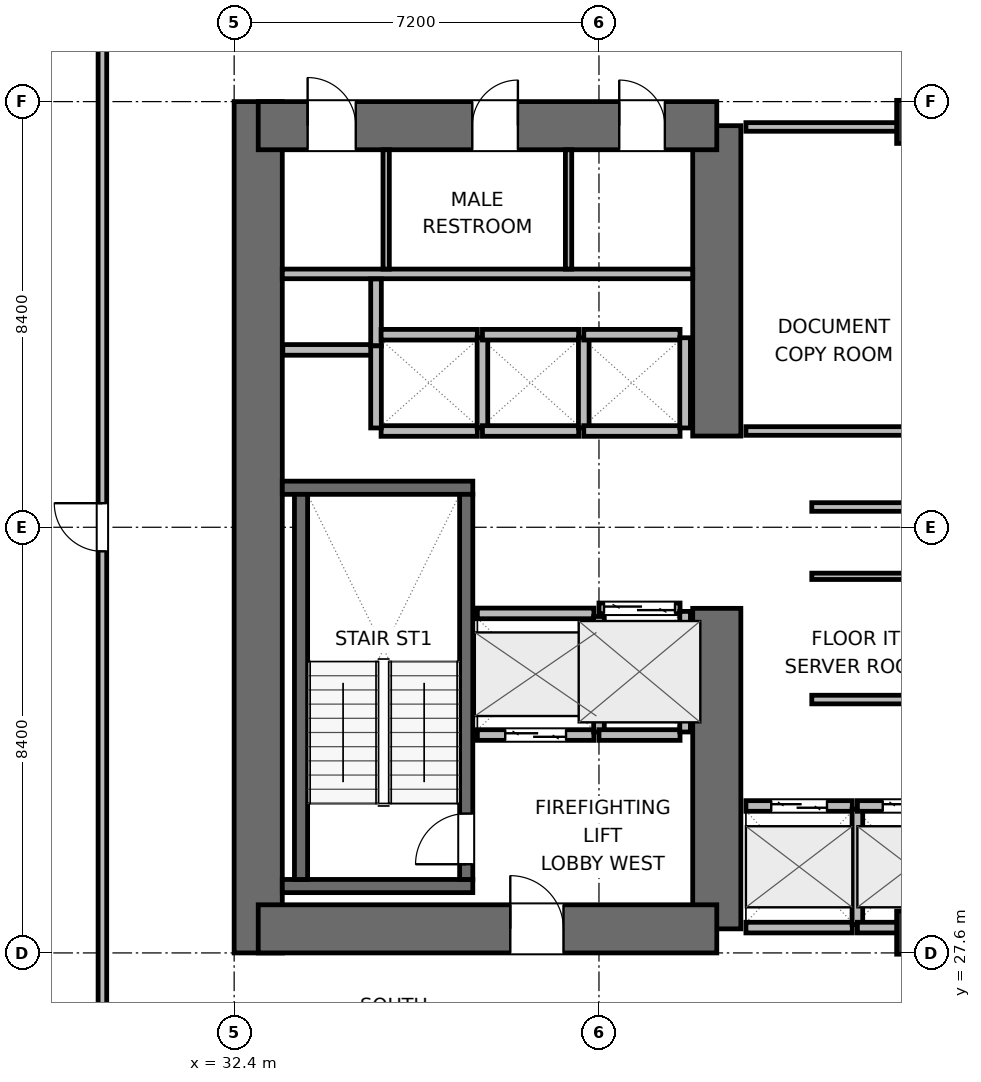
"""IFC4 building model, lengths in metres.
Left out: names, types, materials, properties, quantities, classifications, styles, units other than length and angle.
Written with IfcOpenShell. Run it as: python <this file> out.ifc"""

import sys

from ifc_helpers import new_model, si_unit, direction, frame, frame_2d, origin, origin_2d, place, context, subcontext, project, spatial, rectangle, extrude, element, fill, save


model = new_model("IFC4")
c1 = context("Model", 3, precision=1e-05, world=origin(), true_north=direction((0.0, 1.0)))
c2 = subcontext(c1, "Body", "Model", "MODEL_VIEW")
j1 = project(units=[si_unit("LENGTHUNIT", "METRE"), si_unit("PLANEANGLEUNIT", "RADIAN")], contexts=[c1])
p1 = place(None, origin())
s1 = spatial("IfcSite", under=j1, at=p1, CompositionType="ELEMENT")
p2 = place(p1, origin())
s2 = spatial("IfcBuilding", under=s1, at=p2, CompositionType="ELEMENT")
p3 = place(p2, frame((0.0, 0.0, 52.8)))
s3 = spatial("IfcBuildingStorey", under=s2, at=p3, CompositionType="ELEMENT", Elevation=52.8)
p4 = place(p3, frame((32.875, 27.6, 0.0), z_axis=(0.0, 0.0, 1.0), x_axis=(0.0, 1.0, 0.0)))
e1 = element("IfcWall", 1, at=p4, inside=s3, PredefinedType="SHEAR", context=c2, shape_type="SweptSolid", body=[
    extrude(rectangle(XDim=16.8, YDim=0.95, at=frame_2d((8.4, 0.0))), origin(), (0.0, 0.0, 1.0), 3.9),
])
p5 = place(p3, frame((41.925, 28.075, 0.0), z_axis=(0.0, 0.0, 1.0), x_axis=(0.0, 1.0, 0.0)))
e2 = element("IfcWall", 2, at=p5, inside=s3, PredefinedType="SHEAR", context=c2, shape_type="SweptSolid", body=[
    extrude(rectangle(XDim=6.325, YDim=0.95, at=frame_2d((3.163, 0.0))), origin(), (0.0, 0.0, 1.0), 3.9),
])
p6 = place(p3, frame((41.925, 37.8, 0.0), z_axis=(0.0, 0.0, 1.0), x_axis=(0.0, 1.0, 0.0)))
e3 = element("IfcWall", 3, at=p6, inside=s3, PredefinedType="SHEAR", context=c2, shape_type="SweptSolid", body=[
    extrude(rectangle(XDim=6.125, YDim=0.95, at=frame_2d((3.062, 0.0))), origin(), (0.0, 0.0, 1.0), 3.9),
])
p7 = place(p3, frame((32.875, 28.075, 0.0), z_axis=(0.0, 0.0, 1.0), x_axis=(1.0, 0.0, 0.0)))
e4 = element("IfcWall", 4, at=p7, inside=s3, PredefinedType="SHEAR", context=c2, shape_type="SweptSolid", body=[
    extrude(rectangle(XDim=9.05, YDim=0.95, at=frame_2d((4.525, 0.0))), origin(), (0.0, 0.0, 1.0), 3.9),
])
p8 = place(p7, frame((4.975, 0.0, 0.0)))
e5 = element("IfcOpeningElement", 5, at=p8, cuts=e4, PredefinedType="OPENING", context=c2, shape_type="SweptSolid", body=[
    extrude(rectangle(XDim=1.05, YDim=2.04, at=frame_2d((0.525, 1.02))), frame((0.0, 0.485, 0.0), z_axis=(0.0, -1.0, 0.0), x_axis=(1.0, 0.0, 0.0)), (0.0, 0.0, 1.0), 0.97),
])
p9 = place(p3, frame((32.875, 43.925, 0.0), z_axis=(0.0, 0.0, 1.0), x_axis=(1.0, 0.0, 0.0)))
e6 = element("IfcWall", 6, at=p9, inside=s3, PredefinedType="SHEAR", context=c2, shape_type="SweptSolid", body=[
    extrude(rectangle(XDim=9.05, YDim=0.95, at=frame_2d((4.525, 0.0))), origin(), (0.0, 0.0, 1.0), 3.9),
])
p10 = place(p9, frame((0.975, 0.0, 0.0)))
e7 = element("IfcOpeningElement", 7, at=p10, cuts=e6, PredefinedType="OPENING", context=c2, shape_type="SweptSolid", body=[
    extrude(rectangle(XDim=0.95, YDim=2.04, at=frame_2d((0.475, 1.02))), frame((0.0, 0.485, 0.0), z_axis=(0.0, -1.0, 0.0), x_axis=(1.0, 0.0, 0.0)), (0.0, 0.0, 1.0), 0.97),
])
p11 = place(p9, frame((4.225, 0.0, 0.0)))
e8 = element("IfcOpeningElement", 8, at=p11, cuts=e6, PredefinedType="OPENING", context=c2, shape_type="SweptSolid", body=[
    extrude(rectangle(XDim=0.9, YDim=2.02, at=frame_2d((0.45, 1.01))), frame((0.0, 0.485, 0.0), z_axis=(0.0, -1.0, 0.0), x_axis=(1.0, 0.0, 0.0)), (0.0, 0.0, 1.0), 0.97),
])
p12 = place(p9, frame((7.125, 0.0, 0.0)))
e9 = element("IfcOpeningElement", 9, at=p12, cuts=e6, PredefinedType="OPENING", context=c2, shape_type="SweptSolid", body=[
    extrude(rectangle(XDim=0.9, YDim=2.02, at=frame_2d((0.45, 1.01))), frame((0.0, 0.485, 0.0), z_axis=(0.0, -1.0, 0.0), x_axis=(1.0, 0.0, 0.0)), (0.0, 0.0, 1.0), 0.97),
])
for number, where, z_axis, x_axis in (
    (10, (33.35, 28.92, 0.0), (0.0, 0.0, 1.0), (1.0, 0.0, 0.0)),
    (11, (33.35, 36.78, 0.0), (0.0, 0.0, 1.0), (1.0, 0.0, 0.0)),
):
    element("IfcWall", number, at=place(p3, frame(where, z_axis=z_axis, x_axis=x_axis)), inside=s3, PredefinedType="SHEAR", context=c2, shape_type="SweptSolid", body=[
        extrude(rectangle(XDim=3.76, YDim=0.26, at=frame_2d((1.88, 0.0))), origin(), (0.0, 0.0, 1.0), 3.9),
    ])
p13 = place(p3, frame((33.72, 29.05, 0.0), z_axis=(0.0, 0.0, 1.0), x_axis=(0.0, 1.0, 0.0)))
e12 = element("IfcWall", 12, at=p13, inside=s3, PredefinedType="SHEAR", context=c2, shape_type="SweptSolid", body=[
    extrude(rectangle(XDim=7.6, YDim=0.26, at=frame_2d((3.8, 0.0))), origin(), (0.0, 0.0, 1.0), 3.9),
])
p14 = place(p3, frame((36.98, 29.05, 0.0), z_axis=(0.0, 0.0, 1.0), x_axis=(0.0, 1.0, 0.0)))
e13 = element("IfcWall", 13, at=p14, inside=s3, PredefinedType="SHEAR", context=c2, shape_type="SweptSolid", body=[
    extrude(rectangle(XDim=7.6, YDim=0.26, at=frame_2d((3.8, 0.0))), origin(), (0.0, 0.0, 1.0), 3.9),
])
p15 = place(p14, frame((0.3, 0.0, 0.0)))
e14 = element("IfcOpeningElement", 14, at=p15, cuts=e13, PredefinedType="OPENING", context=c2, shape_type="SweptSolid", body=[
    extrude(rectangle(XDim=1.0, YDim=2.04, at=frame_2d((0.5, 1.02))), frame((0.0, 0.14, 0.0), z_axis=(0.0, -1.0, 0.0), x_axis=(1.0, 0.0, 0.0)), (0.0, 0.0, 1.0), 0.28),
])
for number, where, z_axis, x_axis in (
    (15, (45.9, 28.0, 0.0), (0.0, 0.0, 1.0), (1.0, 0.0, 0.0)),
    (16, (45.9, 44.0, 0.0), (0.0, 0.0, 1.0), (1.0, 0.0, 0.0)),
):
    element("IfcColumn", number, at=place(p3, frame(where, z_axis=z_axis, x_axis=x_axis)), inside=s3, PredefinedType="COLUMN", context=c2, shape_type="SweptSolid", body=[
        extrude(rectangle(XDim=0.85, YDim=0.85, at=origin_2d()), origin(), (0.0, 0.0, 1.0), 3.9),
    ])
p16 = place(p3, frame((33.35, 41.0, 0.0), z_axis=(0.0, 0.0, 1.0), x_axis=(1.0, 0.0, 0.0)))
e17 = element("IfcWall", 17, at=p16, inside=s3, PredefinedType="PLUMBINGWALL", context=c2, shape_type="SweptSolid", body=[
    extrude(rectangle(XDim=8.1, YDim=0.19, at=frame_2d((4.05, 0.0))), origin(), (0.0, 0.0, 1.0), 3.64),
])
for number, where, z_axis, x_axis in (
    (18, (35.4, 41.095, 0.0), (0.0, 0.0, 1.0), (0.0, 1.0, 0.0)),
    (19, (39.0, 41.095, 0.0), (0.0, 0.0, 1.0), (0.0, 1.0, 0.0)),
):
    element("IfcWall", number, at=place(p3, frame(where, z_axis=z_axis, x_axis=x_axis)), inside=s3, PredefinedType="PARTITIONING", context=c2, shape_type="SweptSolid", body=[
        extrude(rectangle(XDim=2.355, YDim=0.125, at=frame_2d((1.177, 0.0))), origin(), (0.0, 0.0, 1.0), 3.64),
    ])
p17 = place(p3, frame((33.36, 39.5, 0.0), z_axis=(0.0, 0.0, 1.0), x_axis=(1.0, 0.0, 0.0)))
e20 = element("IfcWall", 20, at=p17, inside=s3, PredefinedType="PARTITIONING", context=c2, shape_type="SweptSolid", body=[
    extrude(rectangle(XDim=1.86, YDim=0.21, at=frame_2d((0.93, 0.0))), origin(), (0.0, 0.0, 1.0), 3.64),
])
p18 = place(p3, frame((35.2, 39.58, 0.0), z_axis=(0.0, 0.0, 1.0), x_axis=(0.0, 1.0, 0.0)))
e21 = element("IfcWall", 21, at=p18, inside=s3, PredefinedType="PARTITIONING", context=c2, shape_type="SweptSolid", body=[
    extrude(rectangle(XDim=1.32, YDim=0.21, at=frame_2d((0.66, 0.0))), origin(), (0.0, 0.0, 1.0), 3.64),
])
p19 = place(p3, frame((37.2, 31.9, 0.0), z_axis=(0.0, 0.0, 1.0), x_axis=(1.0, 0.0, 0.0)))
e22 = element("IfcWall", 22, at=p19, inside=s3, PredefinedType="PARTITIONING", context=c2, shape_type="SweptSolid", body=[
    extrude(rectangle(XDim=2.3, YDim=0.21, at=frame_2d((1.15, 0.0))), origin(), (0.0, 0.0, 1.0), 3.64),
])
p20 = place(p19, frame((0.55, 0.0, 0.0)))
e23 = element("IfcOpeningElement", 23, at=p20, cuts=e22, PredefinedType="OPENING", context=c2, shape_type="SweptSolid", body=[
    extrude(rectangle(XDim=1.2, YDim=2.04, at=frame_2d((0.6, 1.02))), frame((0.0, 0.115, 0.0), z_axis=(0.0, -1.0, 0.0), x_axis=(1.0, 0.0, 0.0)), (0.0, 0.0, 1.0), 0.23),
])
p21 = place(p3, frame((37.2, 34.3, 0.0), z_axis=(0.0, 0.0, 1.0), x_axis=(1.0, 0.0, 0.0)))
e24 = element("IfcWall", 24, at=p21, inside=s3, PredefinedType="PARTITIONING", context=c2, shape_type="SweptSolid", body=[
    extrude(rectangle(XDim=2.3, YDim=0.21, at=frame_2d((1.15, 0.0))), origin(), (0.0, 0.0, 1.0), 3.64),
])
p22 = place(p3, frame((39.6, 31.96, 0.0), z_axis=(0.0, 0.0, 1.0), x_axis=(0.0, 1.0, 0.0)))
e25 = element("IfcWall", 25, at=p22, inside=s3, PredefinedType="PARTITIONING", context=c2, shape_type="SweptSolid", body=[
    extrude(rectangle(XDim=2.28, YDim=0.21, at=frame_2d((1.14, 0.0))), origin(), (0.0, 0.0, 1.0), 3.64),
])
p23 = place(p3, frame((39.6, 34.4, 0.0), z_axis=(0.0, 0.0, 1.0), x_axis=(1.0, 0.0, 0.0)))
e26 = element("IfcWall", 26, at=p23, inside=s3, PredefinedType="PARTITIONING", context=c2, shape_type="SweptSolid", body=[
    extrude(rectangle(XDim=1.6, YDim=0.21, at=frame_2d((0.8, 0.0))), origin(), (0.0, 0.0, 1.0), 3.64),
])
p24 = place(p23, frame((0.1, 0.0, 0.0)))
e27 = element("IfcOpeningElement", 27, at=p24, cuts=e26, PredefinedType="OPENING", context=c2, shape_type="SweptSolid", body=[
    extrude(rectangle(XDim=1.4, YDim=2.06, at=frame_2d((0.7, 1.03))), frame((0.0, 0.115, 0.0), z_axis=(0.0, -1.0, 0.0), x_axis=(1.0, 0.0, 0.0)), (0.0, 0.0, 1.0), 0.23),
])
p25 = place(p3, frame((39.6, 31.9, 0.0), z_axis=(0.0, 0.0, 1.0), x_axis=(1.0, 0.0, 0.0)))
e28 = element("IfcWall", 28, at=p25, inside=s3, PredefinedType="PARTITIONING", context=c2, shape_type="SweptSolid", body=[
    extrude(rectangle(XDim=1.6, YDim=0.21, at=frame_2d((0.8, 0.0))), origin(), (0.0, 0.0, 1.0), 3.64),
])
p26 = place(p3, frame((41.3, 31.96, 0.0), z_axis=(0.0, 0.0, 1.0), x_axis=(0.0, 1.0, 0.0)))
e29 = element("IfcWall", 29, at=p26, inside=s3, PredefinedType="PARTITIONING", context=c2, shape_type="SweptSolid", body=[
    extrude(rectangle(XDim=2.38, YDim=0.21, at=frame_2d((1.19, 0.0))), origin(), (0.0, 0.0, 1.0), 3.64),
])
p27 = place(p3, frame((42.5, 30.5, 0.0), z_axis=(0.0, 0.0, 1.0), x_axis=(1.0, 0.0, 0.0)))
e30 = element("IfcWall", 30, at=p27, inside=s3, PredefinedType="PARTITIONING", context=c2, shape_type="SweptSolid", body=[
    extrude(rectangle(XDim=2.1, YDim=0.21, at=frame_2d((1.05, 0.0))), origin(), (0.0, 0.0, 1.0), 3.64),
])
p28 = place(p27, frame((0.5, 0.0, 0.0)))
e31 = element("IfcOpeningElement", 31, at=p28, cuts=e30, PredefinedType="OPENING", context=c2, shape_type="SweptSolid", body=[
    extrude(rectangle(XDim=1.1, YDim=2.04, at=frame_2d((0.55, 1.02))), frame((0.0, 0.115, 0.0), z_axis=(0.0, -1.0, 0.0), x_axis=(1.0, 0.0, 0.0)), (0.0, 0.0, 1.0), 0.23),
])
p29 = place(p3, frame((42.5, 28.1, 0.0), z_axis=(0.0, 0.0, 1.0), x_axis=(1.0, 0.0, 0.0)))
e32 = element("IfcWall", 32, at=p29, inside=s3, PredefinedType="PARTITIONING", context=c2, shape_type="SweptSolid", body=[
    extrude(rectangle(XDim=2.1, YDim=0.21, at=frame_2d((1.05, 0.0))), origin(), (0.0, 0.0, 1.0), 2.525),
])
p30 = place(p3, frame((44.7, 28.16, 0.0), z_axis=(0.0, 0.0, 1.0), x_axis=(0.0, 1.0, 0.0)))
e33 = element("IfcWall", 33, at=p30, inside=s3, PredefinedType="PARTITIONING", context=c2, shape_type="SweptSolid", body=[
    extrude(rectangle(XDim=2.28, YDim=0.21, at=frame_2d((1.14, 0.0))), origin(), (0.0, 0.0, 1.0), 3.64),
])
p31 = place(p3, frame((44.7, 30.5, 0.0), z_axis=(0.0, 0.0, 1.0), x_axis=(1.0, 0.0, 0.0)))
e34 = element("IfcWall", 34, at=p31, inside=s3, PredefinedType="PARTITIONING", context=c2, shape_type="SweptSolid", body=[
    extrude(rectangle(XDim=2.1, YDim=0.21, at=frame_2d((1.05, 0.0))), origin(), (0.0, 0.0, 1.0), 3.64),
])
p32 = place(p31, frame((0.5, 0.0, 0.0)))
e35 = element("IfcOpeningElement", 35, at=p32, cuts=e34, PredefinedType="OPENING", context=c2, shape_type="SweptSolid", body=[
    extrude(rectangle(XDim=1.1, YDim=2.04, at=frame_2d((0.55, 1.02))), frame((0.0, 0.115, 0.0), z_axis=(0.0, -1.0, 0.0), x_axis=(1.0, 0.0, 0.0)), (0.0, 0.0, 1.0), 0.23),
])
p33 = place(p3, frame((44.7, 28.1, 0.0), z_axis=(0.0, 0.0, 1.0), x_axis=(1.0, 0.0, 0.0)))
e36 = element("IfcWall", 36, at=p33, inside=s3, PredefinedType="PARTITIONING", context=c2, shape_type="SweptSolid", body=[
    extrude(rectangle(XDim=2.1, YDim=0.21, at=frame_2d((1.05, 0.0))), origin(), (0.0, 0.0, 1.0), 2.525),
])
for number, where, z_axis, x_axis in (
    (37, (35.3, 37.9, 0.0), (0.0, 0.0, 1.0), (1.0, 0.0, 0.0)),
    (38, (35.3, 39.8, 0.0), (0.0, 0.0, 1.0), (1.0, 0.0, 0.0)),
):
    element("IfcWall", number, at=place(p3, frame(where, z_axis=z_axis, x_axis=x_axis)), inside=s3, PredefinedType="PARTITIONING", context=c2, shape_type="SweptSolid", body=[
        extrude(rectangle(XDim=1.9, YDim=0.21, at=frame_2d((0.95, 0.0))), origin(), (0.0, 0.0, 1.0), 3.64),
    ])
p34 = place(p3, frame((35.2, 37.96, 0.0), z_axis=(0.0, 0.0, 1.0), x_axis=(0.0, 1.0, 0.0)))
e39 = element("IfcWall", 39, at=p34, inside=s3, PredefinedType="PARTITIONING", context=c2, shape_type="SweptSolid", body=[
    extrude(rectangle(XDim=1.62, YDim=0.21, at=frame_2d((0.81, 0.0))), origin(), (0.0, 0.0, 1.0), 3.64),
])
p35 = place(p3, frame((37.3, 37.96, 0.0), z_axis=(0.0, 0.0, 1.0), x_axis=(0.0, 1.0, 0.0)))
e40 = element("IfcWall", 40, at=p35, inside=s3, PredefinedType="PARTITIONING", context=c2, shape_type="SweptSolid", body=[
    extrude(rectangle(XDim=1.78, YDim=0.21, at=frame_2d((0.89, 0.0))), origin(), (0.0, 0.0, 1.0), 3.64),
])
for number, where, z_axis, x_axis in (
    (41, (37.3, 37.9, 0.0), (0.0, 0.0, 1.0), (1.0, 0.0, 0.0)),
    (42, (37.3, 39.8, 0.0), (0.0, 0.0, 1.0), (1.0, 0.0, 0.0)),
):
    element("IfcWall", number, at=place(p3, frame(where, z_axis=z_axis, x_axis=x_axis)), inside=s3, PredefinedType="PARTITIONING", context=c2, shape_type="SweptSolid", body=[
        extrude(rectangle(XDim=1.9, YDim=0.21, at=frame_2d((0.95, 0.0))), origin(), (0.0, 0.0, 1.0), 3.64),
    ])
p36 = place(p3, frame((39.3, 37.96, 0.0), z_axis=(0.0, 0.0, 1.0), x_axis=(0.0, 1.0, 0.0)))
e43 = element("IfcWall", 43, at=p36, inside=s3, PredefinedType="PARTITIONING", context=c2, shape_type="SweptSolid", body=[
    extrude(rectangle(XDim=1.78, YDim=0.21, at=frame_2d((0.89, 0.0))), origin(), (0.0, 0.0, 1.0), 3.64),
])
for number, where, z_axis, x_axis in (
    (44, (39.3, 37.9, 0.0), (0.0, 0.0, 1.0), (1.0, 0.0, 0.0)),
    (45, (39.3, 39.8, 0.0), (0.0, 0.0, 1.0), (1.0, 0.0, 0.0)),
):
    element("IfcWall", number, at=place(p3, frame(where, z_axis=z_axis, x_axis=x_axis)), inside=s3, PredefinedType="PARTITIONING", context=c2, shape_type="SweptSolid", body=[
        extrude(rectangle(XDim=1.9, YDim=0.21, at=frame_2d((0.95, 0.0))), origin(), (0.0, 0.0, 1.0), 3.64),
    ])
p37 = place(p3, frame((41.3, 37.96, 0.0), z_axis=(0.0, 0.0, 1.0), x_axis=(0.0, 1.0, 0.0)))
e46 = element("IfcWall", 46, at=p37, inside=s3, PredefinedType="PARTITIONING", context=c2, shape_type="SweptSolid", body=[
    extrude(rectangle(XDim=1.78, YDim=0.21, at=frame_2d((0.89, 0.0))), origin(), (0.0, 0.0, 1.0), 3.64),
])
for number, where, z_axis, x_axis in (
    (47, (43.8, 32.6, 0.0), (0.0, 0.0, 1.0), (1.0, 0.0, 0.0)),
    (48, (43.8, 36.4, 0.0), (0.0, 0.0, 1.0), (1.0, 0.0, 0.0)),
):
    element("IfcWall", number, at=place(p3, frame(where, z_axis=z_axis, x_axis=x_axis)), inside=s3, PredefinedType="PARTITIONING", context=c2, shape_type="SweptSolid", body=[
        extrude(rectangle(XDim=2.913, YDim=0.17, at=frame_2d((1.457, 0.0))), origin(), (0.0, 0.0, 1.0), 3.64),
    ])
p38 = place(p3, frame((43.8, 35.032, 0.0), z_axis=(0.0, 0.0, 1.0), x_axis=(1.0, 0.0, 0.0)))
e49 = element("IfcWall", 49, at=p38, inside=s3, PredefinedType="PARTITIONING", context=c2, shape_type="SweptSolid", body=[
    extrude(rectangle(XDim=2.913, YDim=0.125, at=frame_2d((1.457, 0.0))), origin(), (0.0, 0.0, 1.0), 3.64),
])
p39 = place(p3, frame((42.5, 37.9, 0.0), z_axis=(0.0, 0.0, 1.0), x_axis=(1.0, 0.0, 0.0)))
e50 = element("IfcWall", 50, at=p39, inside=s3, PredefinedType="PARTITIONING", context=c2, shape_type="SweptSolid", body=[
    extrude(rectangle(XDim=4.213, YDim=0.17, at=frame_2d((2.106, 0.0))), origin(), (0.0, 0.0, 1.0), 3.64),
])
p40 = place(p3, frame((42.5, 43.9, 0.0), z_axis=(0.0, 0.0, 1.0), x_axis=(1.0, 0.0, 0.0)))
e51 = element("IfcWall", 51, at=p40, inside=s3, PredefinedType="PARTITIONING", context=c2, shape_type="SweptSolid", body=[
    extrude(rectangle(XDim=4.213, YDim=0.17, at=frame_2d((2.106, 0.0))), origin(), (0.0, 0.0, 1.0), 2.525),
])
p41 = place(p3, frame((29.8, 24.977, 0.0), z_axis=(0.0, 0.0, 1.0), x_axis=(0.0, 1.0, 0.0)))
e52 = element("IfcWall", 52, at=p41, inside=s3, PredefinedType="PARTITIONING", context=c2, shape_type="SweptSolid", body=[
    extrude(rectangle(XDim=22.046, YDim=0.17, at=frame_2d((11.023, 0.0))), origin(), (0.0, 0.0, 1.0), 3.64),
])
p42 = place(p41, frame((10.548, 0.0, 0.0)))
e53 = element("IfcOpeningElement", 53, at=p42, cuts=e52, PredefinedType="OPENING", context=c2, shape_type="SweptSolid", body=[
    extrude(rectangle(XDim=0.95, YDim=2.04, at=frame_2d((0.475, 1.02))), frame((0.0, 0.095, 0.0), z_axis=(0.0, -1.0, 0.0), x_axis=(1.0, 0.0, 0.0)), (0.0, 0.0, 1.0), 0.19),
])
p43 = place(p15, origin())
e54 = element("IfcDoor", 54, at=p43, inside=s3, OperationType="SINGLE_SWING_LEFT", PredefinedType="DOOR", context=c2, shape_type="SweptSolid", body=[
    extrude(rectangle(XDim=1.0, YDim=2.04, at=frame_2d((0.5, 1.02))), frame((0.0, 0.025, 0.0), z_axis=(0.0, -1.0, 0.0), x_axis=(1.0, 0.0, 0.0)), (0.0, 0.0, 1.0), 0.05),
])
fill(e14, e54)
p44 = place(p20, origin())
e55 = element("IfcDoor", 55, at=p44, inside=s3, OperationType="DOUBLE_DOOR_SLIDING", PredefinedType="DOOR", context=c2, shape_type="SweptSolid", body=[
    extrude(rectangle(XDim=1.2, YDim=2.04, at=frame_2d((0.6, 1.02))), frame((0.0, 0.025, 0.0), z_axis=(0.0, -1.0, 0.0), x_axis=(1.0, 0.0, 0.0)), (0.0, 0.0, 1.0), 0.05),
])
fill(e23, e55)
p45 = place(p24, origin())
e56 = element("IfcDoor", 56, at=p45, inside=s3, OperationType="DOUBLE_DOOR_SLIDING", PredefinedType="DOOR", context=c2, shape_type="SweptSolid", body=[
    extrude(rectangle(XDim=1.4, YDim=2.06, at=frame_2d((0.7, 1.03))), frame((0.0, 0.025, 0.0), z_axis=(0.0, -1.0, 0.0), x_axis=(1.0, 0.0, 0.0)), (0.0, 0.0, 1.0), 0.05),
])
fill(e27, e56)
p46 = place(p28, origin())
e57 = element("IfcDoor", 57, at=p46, inside=s3, OperationType="DOUBLE_DOOR_SLIDING", PredefinedType="DOOR", context=c2, shape_type="SweptSolid", body=[
    extrude(rectangle(XDim=1.1, YDim=2.04, at=frame_2d((0.55, 1.02))), frame((0.0, 0.025, 0.0), z_axis=(0.0, -1.0, 0.0), x_axis=(1.0, 0.0, 0.0)), (0.0, 0.0, 1.0), 0.05),
])
fill(e31, e57)
p47 = place(p32, origin())
e58 = element("IfcDoor", 58, at=p47, inside=s3, OperationType="DOUBLE_DOOR_SLIDING", PredefinedType="DOOR", context=c2, shape_type="SweptSolid", body=[
    extrude(rectangle(XDim=1.1, YDim=2.04, at=frame_2d((0.55, 1.02))), frame((0.0, 0.025, 0.0), z_axis=(0.0, -1.0, 0.0), x_axis=(1.0, 0.0, 0.0)), (0.0, 0.0, 1.0), 0.05),
])
fill(e35, e58)
p48 = place(p8, origin())
e59 = element("IfcDoor", 59, at=p48, inside=s3, OperationType="SINGLE_SWING_LEFT", PredefinedType="DOOR", context=c2, shape_type="SweptSolid", body=[
    extrude(rectangle(XDim=1.05, YDim=2.04, at=frame_2d((0.525, 1.02))), frame((0.0, 0.025, 0.0), z_axis=(0.0, -1.0, 0.0), x_axis=(1.0, 0.0, 0.0)), (0.0, 0.0, 1.0), 0.05),
])
fill(e5, e59)
p49 = place(p10, origin())
e60 = element("IfcDoor", 60, at=p49, inside=s3, OperationType="SINGLE_SWING_LEFT", PredefinedType="DOOR", context=c2, shape_type="SweptSolid", body=[
    extrude(rectangle(XDim=0.95, YDim=2.04, at=frame_2d((0.475, 1.02))), frame((0.0, 0.025, 0.0), z_axis=(0.0, -1.0, 0.0), x_axis=(1.0, 0.0, 0.0)), (0.0, 0.0, 1.0), 0.05),
])
fill(e7, e60)
p50 = place(p11, origin())
e61 = element("IfcDoor", 61, at=p50, inside=s3, OperationType="SINGLE_SWING_RIGHT", PredefinedType="DOOR", context=c2, shape_type="SweptSolid", body=[
    extrude(rectangle(XDim=0.9, YDim=2.02, at=frame_2d((0.45, 1.01))), frame((0.0, 0.025, 0.0), z_axis=(0.0, -1.0, 0.0), x_axis=(1.0, 0.0, 0.0)), (0.0, 0.0, 1.0), 0.05),
])
fill(e8, e61)
p51 = place(p12, origin())
e62 = element("IfcDoor", 62, at=p51, inside=s3, OperationType="SINGLE_SWING_LEFT", PredefinedType="DOOR", context=c2, shape_type="SweptSolid", body=[
    extrude(rectangle(XDim=0.9, YDim=2.02, at=frame_2d((0.45, 1.01))), frame((0.0, 0.025, 0.0), z_axis=(0.0, -1.0, 0.0), x_axis=(1.0, 0.0, 0.0)), (0.0, 0.0, 1.0), 0.05),
])
fill(e9, e62)
p52 = place(p42, origin())
e63 = element("IfcDoor", 63, at=p52, inside=s3, OperationType="SINGLE_SWING_RIGHT", PredefinedType="DOOR", context=c2, shape_type="SweptSolid", body=[
    extrude(rectangle(XDim=0.95, YDim=2.04, at=frame_2d((0.475, 1.02))), frame((0.0, 0.025, 0.0), z_axis=(0.0, -1.0, 0.0), x_axis=(1.0, 0.0, 0.0)), (0.0, 0.0, 1.0), 0.05),
])
fill(e53, e63)
save(model, sys.argv[1])
